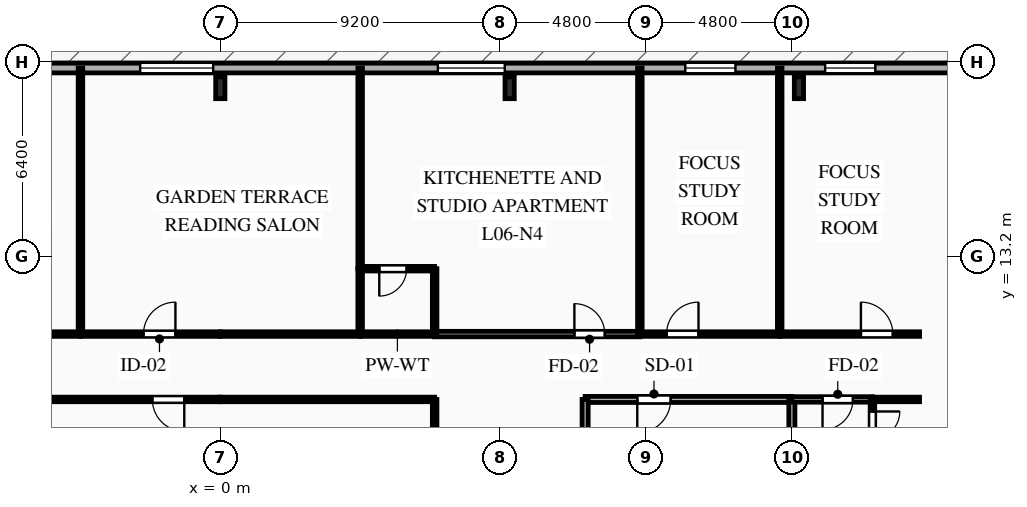
"""IFC4 building model, lengths in metres.
Left out: names, types, materials, properties, quantities, classifications, styles, units other than length and angle.
Written with IfcOpenShell. Run it as: python <this file> out.ifc"""

import sys

from ifc_helpers import new_model, si_unit, direction, frame, frame_2d, origin, origin_2d, place, context, subcontext, project, spatial, rectangle, i_section, extrude, element, fill, save


model = new_model("IFC4")
c1 = context("Model", 3, precision=1e-05, world=origin(), true_north=direction((0.0, 1.0)))
c2 = subcontext(c1, "Body", "Model", "MODEL_VIEW")
j1 = project(units=[si_unit("LENGTHUNIT", "METRE"), si_unit("PLANEANGLEUNIT", "RADIAN")], contexts=[c1])
p1 = place(None, origin())
s1 = spatial("IfcSite", under=j1, at=p1, CompositionType="ELEMENT")
p2 = place(p1, origin())
s2 = spatial("IfcBuilding", under=s1, at=p2, CompositionType="ELEMENT")
p3 = place(p2, frame((0.0, 0.0, 27.0)))
s3 = spatial("IfcBuildingStorey", under=s2, at=p3, CompositionType="ELEMENT", Elevation=27.0)
for number, where, z_axis, x_axis in (
    (1, (19.033, 18.75, 0.0), (0.0, 0.0, 1.0), (1.0, 0.0, 0.0)),
    (2, (9.517, 18.75, 0.0), (0.0, 0.0, 1.0), (1.0, 0.0, 0.0)),
    (3, (0.0, 18.75, 0.0), (0.0, 0.0, 1.0), (1.0, 0.0, 0.0)),
):
    element("IfcColumn", number, at=place(p3, frame(where, z_axis=z_axis, x_axis=x_axis)), inside=s3, PredefinedType="COLUMN", context=c2, shape_type="SweptSolid", body=[
        extrude(i_section(OverallWidth=0.304, OverallDepth=0.716, WebThickness=0.021, FlangeThickness=0.04, FilletRadius=0.027, at=origin_2d()), origin(), (0.0, 0.0, 1.0), 3.35),
    ])
p4 = place(p3, frame((-29.2, 19.4, 0.0), z_axis=(0.0, 0.0, 1.0), x_axis=(1.0, 0.0, 0.0)))
e4 = element("IfcWall", 4, at=p4, inside=s3, PredefinedType="SOLIDWALL", context=c2, shape_type="SweptSolid", body=[
    extrude(rectangle(XDim=58.4, YDim=0.32, at=frame_2d((29.2, 0.0))), origin(), (0.0, 0.0, 1.0), 3.035),
])
p5 = place(p4, frame((1.5, 0.0, 0.0)))
e5 = element("IfcOpeningElement", 5, at=p5, cuts=e4, PredefinedType="OPENING", context=c2, shape_type="SweptSolid", body=[
    extrude(rectangle(XDim=1.5, YDim=2.2, at=frame_2d((0.75, 1.1))), frame((0.0, 0.17, 0.0), z_axis=(0.0, -1.0, 0.0), x_axis=(1.0, 0.0, 0.0)), (0.0, 0.0, 1.0), 0.34),
])
p6 = place(p4, frame((3.531, 0.0, 0.85)))
e6 = element("IfcOpeningElement", 6, at=p6, cuts=e4, PredefinedType="OPENING", context=c2, shape_type="SweptSolid", body=[
    extrude(rectangle(XDim=1.8, YDim=1.85, at=frame_2d((0.9, 0.925))), frame((0.0, 0.17, 0.0), z_axis=(0.0, -1.0, 0.0), x_axis=(1.0, 0.0, 0.0)), (0.0, 0.0, 1.0), 0.34),
])
p7 = place(p4, frame((7.695, 0.0, 0.85)))
e7 = element("IfcOpeningElement", 7, at=p7, cuts=e4, PredefinedType="OPENING", context=c2, shape_type="SweptSolid", body=[
    extrude(rectangle(XDim=1.65, YDim=1.85, at=frame_2d((0.825, 0.925))), frame((0.0, 0.17, 0.0), z_axis=(0.0, -1.0, 0.0), x_axis=(1.0, 0.0, 0.0)), (0.0, 0.0, 1.0), 0.34),
])
p8 = place(p4, frame((12.335, 0.0, 0.85)))
e8 = element("IfcOpeningElement", 8, at=p8, cuts=e4, PredefinedType="OPENING", context=c2, shape_type="SweptSolid", body=[
    extrude(rectangle(XDim=1.65, YDim=1.85, at=frame_2d((0.825, 0.925))), frame((0.0, 0.17, 0.0), z_axis=(0.0, -1.0, 0.0), x_axis=(1.0, 0.0, 0.0)), (0.0, 0.0, 1.0), 0.34),
])
p9 = place(p4, frame((20.315, 0.0, 0.85)))
e9 = element("IfcOpeningElement", 9, at=p9, cuts=e4, PredefinedType="OPENING", context=c2, shape_type="SweptSolid", body=[
    extrude(rectangle(XDim=2.4, YDim=1.95, at=frame_2d((1.2, 0.975))), frame((0.0, 0.17, 0.0), z_axis=(0.0, -1.0, 0.0), x_axis=(1.0, 0.0, 0.0)), (0.0, 0.0, 1.0), 0.34),
])
p10 = place(p4, frame((26.565, 0.0, 0.85)))
e10 = element("IfcOpeningElement", 10, at=p10, cuts=e4, PredefinedType="OPENING", context=c2, shape_type="SweptSolid", body=[
    extrude(rectangle(XDim=2.4, YDim=1.95, at=frame_2d((1.2, 0.975))), frame((0.0, 0.17, 0.0), z_axis=(0.0, -1.0, 0.0), x_axis=(1.0, 0.0, 0.0)), (0.0, 0.0, 1.0), 0.34),
])
p11 = place(p4, frame((36.356, 0.0, 0.85)))
e11 = element("IfcOpeningElement", 11, at=p11, cuts=e4, PredefinedType="OPENING", context=c2, shape_type="SweptSolid", body=[
    extrude(rectangle(XDim=2.2, YDim=1.85, at=frame_2d((1.1, 0.925))), frame((0.0, 0.17, 0.0), z_axis=(0.0, -1.0, 0.0), x_axis=(1.0, 0.0, 0.0)), (0.0, 0.0, 1.0), 0.34),
])
p12 = place(p4, frame((44.495, 0.0, 0.85)))
e12 = element("IfcOpeningElement", 12, at=p12, cuts=e4, PredefinedType="OPENING", context=c2, shape_type="SweptSolid", body=[
    extrude(rectangle(XDim=1.65, YDim=1.85, at=frame_2d((0.825, 0.925))), frame((0.0, 0.17, 0.0), z_axis=(0.0, -1.0, 0.0), x_axis=(1.0, 0.0, 0.0)), (0.0, 0.0, 1.0), 0.34),
])
p13 = place(p4, frame((49.095, 0.0, 0.85)))
e13 = element("IfcOpeningElement", 13, at=p13, cuts=e4, PredefinedType="OPENING", context=c2, shape_type="SweptSolid", body=[
    extrude(rectangle(XDim=1.65, YDim=1.85, at=frame_2d((0.825, 0.925))), frame((0.0, 0.17, 0.0), z_axis=(0.0, -1.0, 0.0), x_axis=(1.0, 0.0, 0.0)), (0.0, 0.0, 1.0), 0.34),
])
p14 = place(p3, frame((18.8, 8.5, 0.0), z_axis=(0.0, 0.0, 1.0), x_axis=(-1.0, 0.0, 0.0)))
e14 = element("IfcWall", 14, at=p14, inside=s3, PredefinedType="PARTITIONING", context=c2, shape_type="SweptSolid", body=[
    extrude(rectangle(XDim=6.8, YDim=0.2, at=frame_2d((3.4, 0.0))), origin(), (0.0, 0.0, 1.0), 3.035),
])
p15 = place(p14, frame((3.985, 0.0, 0.0)))
e15 = element("IfcOpeningElement", 15, at=p15, cuts=e14, PredefinedType="OPENING", context=c2, shape_type="SweptSolid", body=[
    extrude(rectangle(XDim=1.1, YDim=2.15, at=frame_2d((0.55, 1.075))), frame((0.0, 0.11, 0.0), z_axis=(0.0, -1.0, 0.0), x_axis=(1.0, 0.0, 0.0)), (0.0, 0.0, 1.0), 0.22),
])
p16 = place(p3, frame((12.0, 8.5, 0.0), z_axis=(0.0, 0.0, 1.0), x_axis=(0.0, -1.0, 0.0)))
e16 = element("IfcWall", 16, at=p16, inside=s3, PredefinedType="PARTITIONING", context=c2, shape_type="SweptSolid", body=[
    extrude(rectangle(XDim=2.9, YDim=0.2, at=frame_2d((1.45, 0.0))), origin(), (0.0, 0.0, 1.0), 3.035),
])
p17 = place(p3, frame((18.8, 5.6, 0.0), z_axis=(0.0, 0.0, 1.0), x_axis=(0.0, 1.0, 0.0)))
e17 = element("IfcWall", 17, at=p17, inside=s3, PredefinedType="PARTITIONING", context=c2, shape_type="SweptSolid", body=[
    extrude(rectangle(XDim=2.9, YDim=0.2, at=frame_2d((1.45, 0.0))), origin(), (0.0, 0.0, 1.0), 2.52),
])
p18 = place(p3, frame((-13.8, 10.65, 0.0), z_axis=(0.0, 0.0, 1.0), x_axis=(1.0, 0.0, 0.0)))
e18 = element("IfcWall", 18, at=p18, inside=s3, PredefinedType="PARTITIONING", context=c2, shape_type="SweptSolid", body=[
    extrude(rectangle(XDim=9.2, YDim=0.15, at=frame_2d((4.6, 0.0))), origin(), (0.0, 0.0, 1.0), 3.035),
])
p19 = place(p18, frame((1.454, 0.0, 0.0)))
e19 = element("IfcOpeningElement", 19, at=p19, cuts=e18, PredefinedType="OPENING", context=c2, shape_type="SweptSolid", body=[
    extrude(rectangle(XDim=1.05, YDim=2.15, at=frame_2d((0.525, 1.075))), frame((0.0, 0.085, 0.0), z_axis=(0.0, -1.0, 0.0), x_axis=(1.0, 0.0, 0.0)), (0.0, 0.0, 1.0), 0.17),
])
p20 = place(p3, frame((-4.6, 10.65, 0.0), z_axis=(0.0, 0.0, 1.0), x_axis=(1.0, 0.0, 0.0)))
e20 = element("IfcWall", 20, at=p20, inside=s3, PredefinedType="PARTITIONING", context=c2, shape_type="SweptSolid", body=[
    extrude(rectangle(XDim=4.6, YDim=0.15, at=frame_2d((2.3, 0.0))), origin(), (0.0, 0.0, 1.0), 3.035),
])
p21 = place(p20, frame((2.074, 0.0, 0.0)))
e21 = element("IfcOpeningElement", 21, at=p21, cuts=e20, PredefinedType="OPENING", context=c2, shape_type="SweptSolid", body=[
    extrude(rectangle(XDim=1.05, YDim=2.15, at=frame_2d((0.525, 1.075))), frame((0.0, 0.085, 0.0), z_axis=(0.0, -1.0, 0.0), x_axis=(1.0, 0.0, 0.0)), (0.0, 0.0, 1.0), 0.17),
])
p22 = place(p3, frame((0.0, 8.5, 0.0), z_axis=(0.0, 0.0, 1.0), x_axis=(-1.0, 0.0, 0.0)))
e22 = element("IfcWall", 22, at=p22, inside=s3, PredefinedType="PARTITIONING", context=c2, shape_type="SweptSolid", body=[
    extrude(rectangle(XDim=7.05, YDim=0.15, at=frame_2d((3.525, 0.0))), origin(), (0.0, 0.0, 1.0), 3.035),
])
p23 = place(p22, frame((1.185, 0.0, 0.0)))
e23 = element("IfcOpeningElement", 23, at=p23, cuts=e22, PredefinedType="OPENING", context=c2, shape_type="SweptSolid", body=[
    extrude(rectangle(XDim=1.05, YDim=2.15, at=frame_2d((0.525, 1.075))), frame((0.0, 0.085, 0.0), z_axis=(0.0, -1.0, 0.0), x_axis=(1.0, 0.0, 0.0)), (0.0, 0.0, 1.0), 0.17),
])
p24 = place(p3, frame((21.45, 8.5, 0.0), z_axis=(0.0, 0.0, 1.0), x_axis=(-1.0, 0.0, 0.0)))
e24 = element("IfcWall", 24, at=p24, inside=s3, PredefinedType="PARTITIONING", context=c2, shape_type="SweptSolid", body=[
    extrude(rectangle(XDim=2.65, YDim=0.18, at=frame_2d((1.325, 0.0))), origin(), (0.0, 0.0, 1.0), 3.035),
])
p25 = place(p24, frame((0.641, 0.0, 0.0)))
e25 = element("IfcOpeningElement", 25, at=p25, cuts=e24, PredefinedType="OPENING", context=c2, shape_type="SweptSolid", body=[
    extrude(rectangle(XDim=1.0, YDim=2.15, at=frame_2d((0.5, 1.075))), frame((0.0, 0.1, 0.0), z_axis=(0.0, -1.0, 0.0), x_axis=(1.0, 0.0, 0.0)), (0.0, 0.0, 1.0), 0.2),
])
p26 = place(p3, frame((23.0, 8.5, 0.0), z_axis=(0.0, 0.0, 1.0), x_axis=(-1.0, 0.0, 0.0)))
e26 = element("IfcWall", 26, at=p26, inside=s3, PredefinedType="PARTITIONING", context=c2, shape_type="SweptSolid", body=[
    extrude(rectangle(XDim=1.55, YDim=0.15, at=frame_2d((0.775, 0.0))), origin(), (0.0, 0.0, 1.0), 3.035),
])
p27 = place(p3, frame((0.0, 10.65, 0.0), z_axis=(0.0, 0.0, 1.0), x_axis=(1.0, 0.0, 0.0)))
e27 = element("IfcWall", 27, at=p27, inside=s3, PredefinedType="PARTITIONING", context=c2, shape_type="SweptSolid", body=[
    extrude(rectangle(XDim=4.6, YDim=0.15, at=frame_2d((2.3, 0.0))), origin(), (0.0, 0.0, 1.0), 3.035),
])
p28 = place(p3, frame((7.05, 10.65, 0.0), z_axis=(0.0, 0.0, 1.0), x_axis=(1.0, 0.0, 0.0)))
e28 = element("IfcWall", 28, at=p28, inside=s3, PredefinedType="PARTITIONING", context=c2, shape_type="SweptSolid", body=[
    extrude(rectangle(XDim=6.75, YDim=0.18, at=frame_2d((3.375, 0.0))), origin(), (0.0, 0.0, 1.0), 3.035),
])
p29 = place(p28, frame((4.596, 0.0, 0.0)))
e29 = element("IfcOpeningElement", 29, at=p29, cuts=e28, PredefinedType="OPENING", context=c2, shape_type="SweptSolid", body=[
    extrude(rectangle(XDim=1.0, YDim=2.15, at=frame_2d((0.5, 1.075))), frame((0.0, 0.1, 0.0), z_axis=(0.0, -1.0, 0.0), x_axis=(1.0, 0.0, 0.0)), (0.0, 0.0, 1.0), 0.2),
])
p30 = place(p3, frame((4.6, 10.65, 0.0), z_axis=(0.0, 0.0, 1.0), x_axis=(1.0, 0.0, 0.0)))
e30 = element("IfcWall", 30, at=p30, inside=s3, PredefinedType="PLUMBINGWALL", context=c2, shape_type="SweptSolid", body=[
    extrude(rectangle(XDim=2.45, YDim=0.15, at=frame_2d((1.225, 0.0))), origin(), (0.0, 0.0, 1.0), 3.035),
])
p31 = place(p3, frame((13.8, 10.65, 0.0), z_axis=(0.0, 0.0, 1.0), x_axis=(1.0, 0.0, 0.0)))
e31 = element("IfcWall", 31, at=p31, inside=s3, PredefinedType="PARTITIONING", context=c2, shape_type="SweptSolid", body=[
    extrude(rectangle(XDim=4.6, YDim=0.15, at=frame_2d((2.3, 0.0))), origin(), (0.0, 0.0, 1.0), 3.035),
])
p32 = place(p31, frame((0.879, 0.0, 0.0)))
e32 = element("IfcOpeningElement", 32, at=p32, cuts=e31, PredefinedType="OPENING", context=c2, shape_type="SweptSolid", body=[
    extrude(rectangle(XDim=1.05, YDim=2.15, at=frame_2d((0.525, 1.075))), frame((0.0, 0.085, 0.0), z_axis=(0.0, -1.0, 0.0), x_axis=(1.0, 0.0, 0.0)), (0.0, 0.0, 1.0), 0.17),
])
p33 = place(p3, frame((18.4, 10.65, 0.0), z_axis=(0.0, 0.0, 1.0), x_axis=(1.0, 0.0, 0.0)))
e33 = element("IfcWall", 33, at=p33, inside=s3, PredefinedType="PARTITIONING", context=c2, shape_type="SweptSolid", body=[
    extrude(rectangle(XDim=4.6, YDim=0.15, at=frame_2d((2.3, 0.0))), origin(), (0.0, 0.0, 1.0), 3.035),
])
p34 = place(p33, frame((2.671, 0.0, 0.0)))
e34 = element("IfcOpeningElement", 34, at=p34, cuts=e33, PredefinedType="OPENING", context=c2, shape_type="SweptSolid", body=[
    extrude(rectangle(XDim=1.05, YDim=2.15, at=frame_2d((0.525, 1.075))), frame((0.0, 0.085, 0.0), z_axis=(0.0, -1.0, 0.0), x_axis=(1.0, 0.0, 0.0)), (0.0, 0.0, 1.0), 0.17),
])
for number, where, z_axis, x_axis in (
    (35, (7.05, 8.5, 0.0), (0.0, 0.0, 1.0), (-1.0, 0.0, 0.0)),
    (36, (7.05, 1.45, 0.0), (0.0, 0.0, 1.0), (0.0, 1.0, 0.0)),
):
    element("IfcWall", number, at=place(p3, frame(where, z_axis=z_axis, x_axis=x_axis)), inside=s3, PredefinedType="PARTITIONING", context=c2, shape_type="SweptSolid", body=[
        extrude(rectangle(XDim=7.05, YDim=0.15, at=frame_2d((3.525, 0.0))), origin(), (0.0, 0.0, 1.0), 3.035),
    ])
p35 = place(p3, frame((21.45, 8.5, 0.0), z_axis=(0.0, 0.0, 1.0), x_axis=(0.0, -1.0, 0.0)))
e37 = element("IfcWall", 37, at=p35, inside=s3, PredefinedType="PARTITIONING", context=c2, shape_type="SweptSolid", body=[
    extrude(rectangle(XDim=1.692, YDim=0.15, at=frame_2d((0.846, 0.0))), origin(), (0.0, 0.0, 1.0), 3.035),
])
p36 = place(p35, frame((0.396, 0.0, 0.0)))
e38 = element("IfcOpeningElement", 38, at=p36, cuts=e37, PredefinedType="OPENING", context=c2, shape_type="SweptSolid", body=[
    extrude(rectangle(XDim=0.9, YDim=2.1, at=frame_2d((0.45, 1.05))), frame((0.0, 0.085, 0.0), z_axis=(0.0, -1.0, 0.0), x_axis=(1.0, 0.0, 0.0)), (0.0, 0.0, 1.0), 0.17),
])
p37 = place(p3, frame((-4.6, 19.4, 0.0), z_axis=(0.0, 0.0, 1.0), x_axis=(0.0, -1.0, 0.0)))
e39 = element("IfcWall", 39, at=p37, inside=s3, PredefinedType="PARTITIONING", context=c2, shape_type="SweptSolid", body=[
    extrude(rectangle(XDim=8.75, YDim=0.15, at=frame_2d((4.375, 0.0))), origin(), (0.0, 0.0, 1.0), 3.035),
])
p38 = place(p3, frame((4.6, 19.4, 0.0), z_axis=(0.0, 0.0, 1.0), x_axis=(0.0, -1.0, 0.0)))
e40 = element("IfcWall", 40, at=p38, inside=s3, PredefinedType="PARTITIONING", context=c2, shape_type="SweptSolid", body=[
    extrude(rectangle(XDim=6.6, YDim=0.15, at=frame_2d((3.3, 0.0))), origin(), (0.0, 0.0, 1.0), 3.035),
])
p39 = place(p3, frame((4.6, 12.8, 0.0), z_axis=(0.0, 0.0, 1.0), x_axis=(0.0, -1.0, 0.0)))
e41 = element("IfcWall", 41, at=p39, inside=s3, PredefinedType="PLUMBINGWALL", context=c2, shape_type="SweptSolid", body=[
    extrude(rectangle(XDim=2.15, YDim=0.15, at=frame_2d((1.075, 0.0))), origin(), (0.0, 0.0, 1.0), 3.035),
])
p40 = place(p3, frame((7.05, 12.8, 0.0), z_axis=(0.0, 0.0, 1.0), x_axis=(-1.0, 0.0, 0.0)))
e42 = element("IfcWall", 42, at=p40, inside=s3, PredefinedType="PLUMBINGWALL", context=c2, shape_type="SweptSolid", body=[
    extrude(rectangle(XDim=2.45, YDim=0.15, at=frame_2d((1.225, 0.0))), origin(), (0.0, 0.0, 1.0), 3.035),
])
p41 = place(p40, frame((0.921, 0.0, 0.0)))
e43 = element("IfcOpeningElement", 43, at=p41, cuts=e42, PredefinedType="OPENING", context=c2, shape_type="SweptSolid", body=[
    extrude(rectangle(XDim=0.9, YDim=2.1, at=frame_2d((0.45, 1.05))), frame((0.0, 0.085, 0.0), z_axis=(0.0, -1.0, 0.0), x_axis=(1.0, 0.0, 0.0)), (0.0, 0.0, 1.0), 0.17),
])
p42 = place(p3, frame((7.05, 10.65, 0.0), z_axis=(0.0, 0.0, 1.0), x_axis=(0.0, 1.0, 0.0)))
e44 = element("IfcWall", 44, at=p42, inside=s3, PredefinedType="PLUMBINGWALL", context=c2, shape_type="SweptSolid", body=[
    extrude(rectangle(XDim=2.15, YDim=0.15, at=frame_2d((1.075, 0.0))), origin(), (0.0, 0.0, 1.0), 3.035),
])
for number, where, z_axis, x_axis in (
    (45, (13.8, 19.4, 0.0), (0.0, 0.0, 1.0), (0.0, -1.0, 0.0)),
    (46, (18.4, 19.4, 0.0), (0.0, 0.0, 1.0), (0.0, -1.0, 0.0)),
):
    element("IfcWall", number, at=place(p3, frame(where, z_axis=z_axis, x_axis=x_axis)), inside=s3, PredefinedType="PARTITIONING", context=c2, shape_type="SweptSolid", body=[
        extrude(rectangle(XDim=8.75, YDim=0.15, at=frame_2d((4.375, 0.0))), origin(), (0.0, 0.0, 1.0), 3.035),
    ])
p43 = place(p10, origin())
e47 = element("IfcWindow", 47, at=p43, inside=s3, PartitioningType="SINGLE_PANEL", PredefinedType="WINDOW", context=c2, shape_type="SweptSolid", body=[
    extrude(rectangle(XDim=2.4, YDim=1.95, at=frame_2d((1.2, 0.975))), frame((0.0, 0.03, 0.0), z_axis=(0.0, -1.0, 0.0), x_axis=(1.0, 0.0, 0.0)), (0.0, 0.0, 1.0), 0.06),
])
fill(e10, e47)
p44 = place(p11, origin())
e48 = element("IfcWindow", 48, at=p44, inside=s3, PartitioningType="SINGLE_PANEL", PredefinedType="WINDOW", context=c2, shape_type="SweptSolid", body=[
    extrude(rectangle(XDim=2.2, YDim=1.85, at=frame_2d((1.1, 0.925))), frame((0.0, 0.03, 0.0), z_axis=(0.0, -1.0, 0.0), x_axis=(1.0, 0.0, 0.0)), (0.0, 0.0, 1.0), 0.06),
])
fill(e11, e48)
p45 = place(p12, origin())
e49 = element("IfcWindow", 49, at=p45, inside=s3, PartitioningType="SINGLE_PANEL", PredefinedType="WINDOW", context=c2, shape_type="SweptSolid", body=[
    extrude(rectangle(XDim=1.65, YDim=1.85, at=frame_2d((0.825, 0.925))), frame((0.0, 0.03, 0.0), z_axis=(0.0, -1.0, 0.0), x_axis=(1.0, 0.0, 0.0)), (0.0, 0.0, 1.0), 0.06),
])
fill(e12, e49)
p46 = place(p13, origin())
e50 = element("IfcWindow", 50, at=p46, inside=s3, PartitioningType="SINGLE_PANEL", PredefinedType="WINDOW", context=c2, shape_type="SweptSolid", body=[
    extrude(rectangle(XDim=1.65, YDim=1.85, at=frame_2d((0.825, 0.925))), frame((0.0, 0.03, 0.0), z_axis=(0.0, -1.0, 0.0), x_axis=(1.0, 0.0, 0.0)), (0.0, 0.0, 1.0), 0.06),
])
fill(e13, e50)
p47 = place(p15, origin())
e51 = element("IfcDoor", 51, at=p47, inside=s3, OperationType="SINGLE_SWING_RIGHT", PredefinedType="DOOR", context=c2, shape_type="SweptSolid", body=[
    extrude(rectangle(XDim=1.1, YDim=2.15, at=frame_2d((0.55, 1.075))), frame((0.0, 0.025, 0.0), z_axis=(0.0, -1.0, 0.0), x_axis=(1.0, 0.0, 0.0)), (0.0, 0.0, 1.0), 0.05),
])
fill(e15, e51)
p48 = place(p21, origin())
e52 = element("IfcDoor", 52, at=p48, inside=s3, OperationType="SINGLE_SWING_RIGHT", PredefinedType="DOOR", context=c2, shape_type="SweptSolid", body=[
    extrude(rectangle(XDim=1.05, YDim=2.15, at=frame_2d((0.525, 1.075))), frame((0.0, 0.025, 0.0), z_axis=(0.0, -1.0, 0.0), x_axis=(1.0, 0.0, 0.0)), (0.0, 0.0, 1.0), 0.05),
])
fill(e21, e52)
p49 = place(p23, origin())
e53 = element("IfcDoor", 53, at=p49, inside=s3, OperationType="SINGLE_SWING_LEFT", PredefinedType="DOOR", context=c2, shape_type="SweptSolid", body=[
    extrude(rectangle(XDim=1.05, YDim=2.15, at=frame_2d((0.525, 1.075))), frame((0.0, 0.025, 0.0), z_axis=(0.0, -1.0, 0.0), x_axis=(1.0, 0.0, 0.0)), (0.0, 0.0, 1.0), 0.05),
])
fill(e23, e53)
p50 = place(p25, origin())
e54 = element("IfcDoor", 54, at=p50, inside=s3, OperationType="SINGLE_SWING_RIGHT", PredefinedType="DOOR", context=c2, shape_type="SweptSolid", body=[
    extrude(rectangle(XDim=1.0, YDim=2.15, at=frame_2d((0.5, 1.075))), frame((0.0, 0.025, 0.0), z_axis=(0.0, -1.0, 0.0), x_axis=(1.0, 0.0, 0.0)), (0.0, 0.0, 1.0), 0.05),
])
fill(e25, e54)
p51 = place(p29, origin())
e55 = element("IfcDoor", 55, at=p51, inside=s3, OperationType="SINGLE_SWING_LEFT", PredefinedType="DOOR", context=c2, shape_type="SweptSolid", body=[
    extrude(rectangle(XDim=1.0, YDim=2.15, at=frame_2d((0.5, 1.075))), frame((0.0, 0.025, 0.0), z_axis=(0.0, -1.0, 0.0), x_axis=(1.0, 0.0, 0.0)), (0.0, 0.0, 1.0), 0.05),
])
fill(e29, e55)
p52 = place(p32, origin())
e56 = element("IfcDoor", 56, at=p52, inside=s3, OperationType="SINGLE_SWING_RIGHT", PredefinedType="DOOR", context=c2, shape_type="SweptSolid", body=[
    extrude(rectangle(XDim=1.05, YDim=2.15, at=frame_2d((0.525, 1.075))), frame((0.0, 0.025, 0.0), z_axis=(0.0, -1.0, 0.0), x_axis=(1.0, 0.0, 0.0)), (0.0, 0.0, 1.0), 0.05),
])
fill(e32, e56)
p53 = place(p34, origin())
e57 = element("IfcDoor", 57, at=p53, inside=s3, OperationType="SINGLE_SWING_LEFT", PredefinedType="DOOR", context=c2, shape_type="SweptSolid", body=[
    extrude(rectangle(XDim=1.05, YDim=2.15, at=frame_2d((0.525, 1.075))), frame((0.0, 0.025, 0.0), z_axis=(0.0, -1.0, 0.0), x_axis=(1.0, 0.0, 0.0)), (0.0, 0.0, 1.0), 0.05),
])
fill(e34, e57)
p54 = place(p36, origin())
e58 = element("IfcDoor", 58, at=p54, inside=s3, OperationType="SINGLE_SWING_LEFT", PredefinedType="DOOR", context=c2, shape_type="SweptSolid", body=[
    extrude(rectangle(XDim=0.9, YDim=2.1, at=frame_2d((0.45, 1.05))), frame((0.0, 0.025, 0.0), z_axis=(0.0, -1.0, 0.0), x_axis=(1.0, 0.0, 0.0)), (0.0, 0.0, 1.0), 0.05),
])
fill(e38, e58)
p55 = place(p41, origin())
e59 = element("IfcDoor", 59, at=p55, inside=s3, OperationType="SINGLE_SWING_RIGHT", PredefinedType="DOOR", context=c2, shape_type="SweptSolid", body=[
    extrude(rectangle(XDim=0.9, YDim=2.1, at=frame_2d((0.45, 1.05))), frame((0.0, 0.025, 0.0), z_axis=(0.0, -1.0, 0.0), x_axis=(1.0, 0.0, 0.0)), (0.0, 0.0, 1.0), 0.05),
])
fill(e43, e59)
save(model, sys.argv[1])
